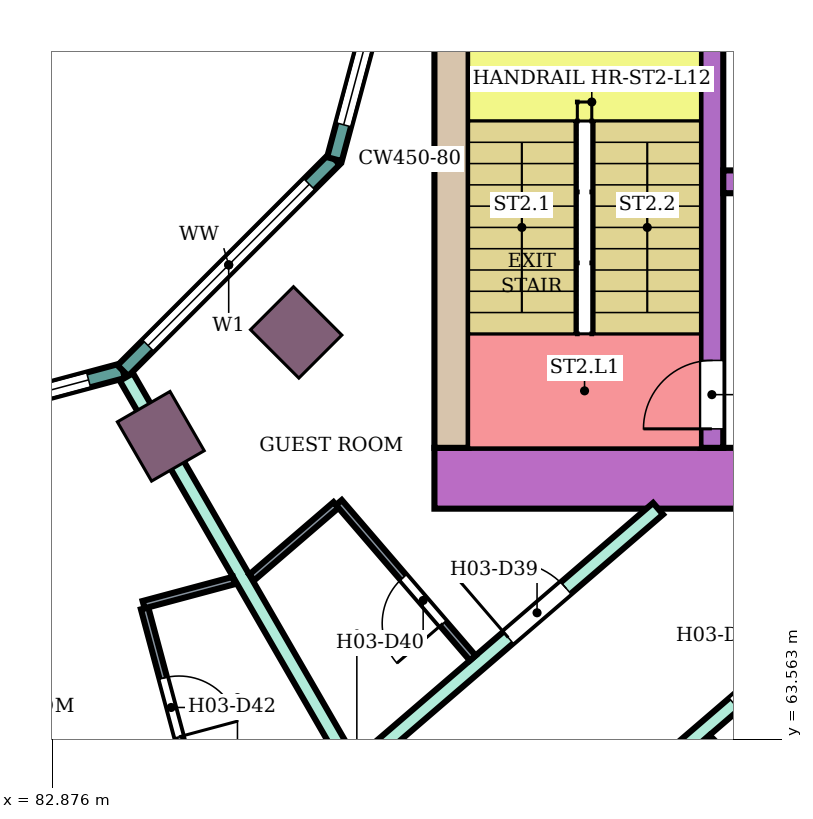
"""IFC4 building model, lengths in metres.
Left out: names, types, materials, properties, quantities, classifications, styles, units other than length and angle.
Written with IfcOpenShell. Run it as: python <this file> out.ifc"""

import sys

from ifc_helpers import new_model, si_unit, direction, frame, frame_2d, origin, origin_2d, place, context, subcontext, project, spatial, rectangle, extrude, element, fill, save


model = new_model("IFC4")
c1 = context("Model", 3, precision=1e-05, world=origin(), true_north=direction((0.0, 1.0)))
c2 = subcontext(c1, "Body", "Model", "MODEL_VIEW")
j1 = project(units=[si_unit("LENGTHUNIT", "METRE"), si_unit("PLANEANGLEUNIT", "RADIAN")], contexts=[c1])
p1 = place(None, origin())
s1 = spatial("IfcSite", under=j1, at=p1, CompositionType="ELEMENT")
p2 = place(p1, origin())
s2 = spatial("IfcBuilding", under=s1, at=p2, CompositionType="ELEMENT")
p3 = place(p2, frame((0.0, 0.0, 55.4)))
s3 = spatial("IfcBuildingStorey", under=s2, at=p3, CompositionType="ELEMENT", Elevation=55.4)
for number, where, z_axis, x_axis in (
    (1, (84.3, 67.552, 0.0), (0.0, 0.0, 1.0), (0.5, -0.866, 0.0)),
    (2, (86.081, 68.919, 0.0), (0.0, 0.0, 1.0), (0.707, -0.707, 0.0)),
):
    element("IfcColumn", number, at=place(p3, frame(where, z_axis=z_axis, x_axis=x_axis)), inside=s3, PredefinedType="COLUMN", context=c2, shape_type="SweptSolid", body=[
        extrude(rectangle(XDim=0.9, YDim=0.8, at=origin_2d()), origin(), (0.0, 0.0, 1.0), 3.8),
    ])
p4 = place(p3, frame((87.9, 67.0, 0.0), z_axis=(0.0, 0.0, 1.0), x_axis=(1.0, 0.0, 0.0)))
e3 = element("IfcWall", 3, at=p4, inside=s3, PredefinedType="SHEAR", context=c2, shape_type="SweptSolid", body=[
    extrude(rectangle(XDim=14.7, YDim=0.8, at=frame_2d((7.35, 0.0))), origin(), (0.0, 0.0, 1.0), 3.48),
])
p5 = place(p4, frame((4.2, 0.0, 0.0)))
e4 = element("IfcOpeningElement", 4, at=p5, cuts=e3, PredefinedType="OPENING", context=c2, shape_type="SweptSolid", body=[
    extrude(rectangle(XDim=2.4, YDim=2.4, at=frame_2d((1.2, 1.2))), frame((0.0, 0.41, 0.0), z_axis=(0.0, -1.0, 0.0), x_axis=(1.0, 0.0, 0.0)), (0.0, 0.0, 1.0), 0.82),
])
p6 = place(p3, frame((88.125, 67.4, 0.0), z_axis=(0.0, 0.0, 1.0), x_axis=(0.0, 1.0, 0.0)))
e5 = element("IfcWall", 5, at=p6, inside=s3, PredefinedType="SHEAR", context=c2, shape_type="SweptSolid", body=[
    extrude(rectangle(XDim=7.6, YDim=0.45, at=frame_2d((3.8, 0.0))), origin(), (0.0, 0.0, 1.0), 3.48),
])
p7 = place(p3, frame((91.55, 67.4, 0.0), z_axis=(0.0, 0.0, 1.0), x_axis=(0.0, 1.0, 0.0)))
e6 = element("IfcWall", 6, at=p7, inside=s3, PredefinedType="SHEAR", context=c2, shape_type="SweptSolid", body=[
    extrude(rectangle(XDim=7.6, YDim=0.3, at=frame_2d((3.8, 0.0))), origin(), (0.0, 0.0, 1.0), 3.48),
])
p8 = place(p7, frame((0.25, 0.0, 0.0)))
e7 = element("IfcOpeningElement", 7, at=p8, cuts=e6, PredefinedType="OPENING", context=c2, shape_type="SweptSolid", body=[
    extrude(rectangle(XDim=0.9, YDim=2.1, at=frame_2d((0.45, 1.05))), frame((0.0, 0.16, 0.0), z_axis=(0.0, -1.0, 0.0), x_axis=(1.0, 0.0, 0.0)), (0.0, 0.0, 1.0), 0.32),
])
p9 = place(p3, frame((91.7, 70.9, 0.0), z_axis=(0.0, 0.0, 1.0), x_axis=(1.0, 0.0, 0.0)))
e8 = element("IfcWall", 8, at=p9, inside=s3, PredefinedType="SHEAR", context=c2, shape_type="SweptSolid", body=[
    extrude(rectangle(XDim=10.9, YDim=0.3, at=frame_2d((5.45, 0.0))), origin(), (0.0, 0.0, 1.0), 3.48),
])
p10 = place(p9, frame((0.4, 0.0, 0.0)))
e9 = element("IfcOpeningElement", 9, at=p10, cuts=e8, PredefinedType="OPENING", context=c2, shape_type="SweptSolid", body=[
    extrude(rectangle(XDim=1.4, YDim=2.1, at=frame_2d((0.7, 1.05))), frame((0.0, 0.16, 0.0), z_axis=(0.0, -1.0, 0.0), x_axis=(1.0, 0.0, 0.0)), (0.0, 0.0, 1.0), 0.32),
])
p11 = place(p9, frame((5.4, 0.0, 0.0)))
e10 = element("IfcOpeningElement", 10, at=p11, cuts=e8, PredefinedType="OPENING", context=c2, shape_type="SweptSolid", body=[
    extrude(rectangle(XDim=1.4, YDim=2.1, at=frame_2d((0.7, 1.05))), frame((0.0, 0.16, 0.0), z_axis=(0.0, -1.0, 0.0), x_axis=(1.0, 0.0, 0.0)), (0.0, 0.0, 1.0), 0.32),
])
p12 = place(p9, frame((8.1, 0.0, 0.0)))
e11 = element("IfcOpeningElement", 11, at=p12, cuts=e8, PredefinedType="OPENING", context=c2, shape_type="SweptSolid", body=[
    extrude(rectangle(XDim=1.0, YDim=2.1, at=frame_2d((0.5, 1.05))), frame((0.0, 0.16, 0.0), z_axis=(0.0, -1.0, 0.0), x_axis=(1.0, 0.0, 0.0)), (0.0, 0.0, 1.0), 0.32),
])
p13 = place(p3, frame((80.0, 67.396, 0.0), z_axis=(0.0, 0.0, 1.0), x_axis=(0.965933654434, 0.258789828301, 0.0)))
e12 = element("IfcWall", 12, at=p13, inside=s3, PredefinedType="NOTDEFINED", context=c2, shape_type="SweptSolid", body=[
    extrude(rectangle(XDim=3.936, YDim=0.2, at=frame_2d((1.968, 0.0))), origin(), (0.0, 0.0, 1.0), 3.8),
])
p14 = place(p13, frame((0.468, 0.0, 0.9)))
e13 = element("IfcOpeningElement", 13, at=p14, cuts=e12, PredefinedType="OPENING", context=c2, shape_type="SweptSolid", body=[
    extrude(rectangle(XDim=3.0, YDim=2.3, at=frame_2d((1.5, 1.15))), frame((0.0, 0.11, 0.0), z_axis=(0.0, -1.0, 0.0), x_axis=(1.0, 0.0, 0.0)), (0.0, 0.0, 1.0), 0.22),
])
p15 = place(p3, frame((83.802, 68.415, 0.0), z_axis=(0.0, 0.0, 1.0), x_axis=(0.707106781187, 0.707106781187, 0.0)))
e14 = element("IfcWall", 14, at=p15, inside=s3, PredefinedType="NOTDEFINED", context=c2, shape_type="SweptSolid", body=[
    extrude(rectangle(XDim=3.936, YDim=0.2, at=frame_2d((1.968, 0.0))), origin(), (0.0, 0.0, 1.0), 3.8),
])
p16 = place(p15, frame((0.468, 0.0, 0.9)))
e15 = element("IfcOpeningElement", 15, at=p16, cuts=e14, PredefinedType="OPENING", context=c2, shape_type="SweptSolid", body=[
    extrude(rectangle(XDim=3.0, YDim=2.3, at=frame_2d((1.5, 1.15))), frame((0.0, 0.11, 0.0), z_axis=(0.0, -1.0, 0.0), x_axis=(1.0, 0.0, 0.0)), (0.0, 0.0, 1.0), 0.22),
])
p17 = place(p3, frame((86.585, 71.198, 0.0), z_axis=(0.0, 0.0, 1.0), x_axis=(0.258789828301, 0.965933654434, 0.0)))
e16 = element("IfcWall", 16, at=p17, inside=s3, PredefinedType="NOTDEFINED", context=c2, shape_type="SweptSolid", body=[
    extrude(rectangle(XDim=3.936, YDim=0.2, at=frame_2d((1.968, 0.0))), origin(), (0.0, 0.0, 1.0), 3.8),
])
p18 = place(p17, frame((0.468, 0.0, 0.9)))
e17 = element("IfcOpeningElement", 17, at=p18, cuts=e16, PredefinedType="OPENING", context=c2, shape_type="SweptSolid", body=[
    extrude(rectangle(XDim=3.0, YDim=2.3, at=frame_2d((1.5, 1.15))), frame((0.0, 0.11, 0.0), z_axis=(0.0, -1.0, 0.0), x_axis=(1.0, 0.0, 0.0)), (0.0, 0.0, 1.0), 0.22),
])
p19 = place(p3, frame((83.848, 68.332, 0.0), z_axis=(0.0, 0.0, 1.0), x_axis=(0.499901724708, -0.866082135617, 0.0)))
e18 = element("IfcWall", 18, at=p19, inside=s3, PredefinedType="PARTITIONING", context=c2, shape_type="SweptSolid", body=[
    extrude(rectangle(XDim=5.855, YDim=0.2, at=frame_2d((2.928, 0.0))), origin(), (0.0, 0.0, 1.0), 3.35),
])
p20 = place(p3, frame((86.877, 63.189, 0.0), z_axis=(0.0, 0.0, 1.0), x_axis=(0.758164888471, 0.652062881853, 0.0)))
e19 = element("IfcWall", 19, at=p20, inside=s3, PredefinedType="PARTITIONING", context=c2, shape_type="SweptSolid", body=[
    extrude(rectangle(XDim=5.23, YDim=0.2, at=frame_2d((2.615, 0.0))), origin(), (0.0, 0.0, 1.0), 3.35),
])
p21 = place(p20, frame((2.63, 0.0, 0.0)))
e20 = element("IfcOpeningElement", 20, at=p21, cuts=e19, PredefinedType="OPENING", context=c2, shape_type="SweptSolid", body=[
    extrude(rectangle(XDim=1.0, YDim=2.1, at=frame_2d((0.5, 1.05))), frame((0.0, 0.11, 0.0), z_axis=(0.0, -1.0, 0.0), x_axis=(1.0, 0.0, 0.0)), (0.0, 0.0, 1.0), 0.22),
])
p22 = place(p3, frame((88.236, 60.929, 0.0), z_axis=(0.0, 0.0, 1.0), x_axis=(0.758227485202, 0.651990092474, 0.0)))
e21 = element("IfcWall", 21, at=p22, inside=s3, PredefinedType="PARTITIONING", context=c2, shape_type="SweptSolid", body=[
    extrude(rectangle(XDim=6.336, YDim=0.2, at=frame_2d((3.168, 0.0))), origin(), (0.0, 0.0, 1.0), 3.35),
])
p23 = place(p22, frame((4.757, 0.0, 0.0)))
e22 = element("IfcOpeningElement", 22, at=p23, cuts=e21, PredefinedType="OPENING", context=c2, shape_type="SweptSolid", body=[
    extrude(rectangle(XDim=1.0, YDim=2.1, at=frame_2d((0.5, 1.05))), frame((0.0, 0.11, 0.0), z_axis=(0.0, -1.0, 0.0), x_axis=(1.0, 0.0, 0.0)), (0.0, 0.0, 1.0), 0.22),
])
p24 = place(p22, frame((0.43, 0.0, 0.0)))
e23 = element("IfcOpeningElement", 23, at=p24, cuts=e21, PredefinedType="OPENING", context=c2, shape_type="SweptSolid", body=[
    extrude(rectangle(XDim=1.0, YDim=2.1, at=frame_2d((0.5, 1.05))), frame((0.0, 0.11, 0.0), z_axis=(0.0, -1.0, 0.0), x_axis=(1.0, 0.0, 0.0)), (0.0, 0.0, 1.0), 0.22),
])
p25 = place(p3, frame((91.449, 63.548, 0.0), z_axis=(0.0, 0.0, 1.0), x_axis=(0.706984810649, -0.707228730688, 0.0)))
e24 = element("IfcWall", 24, at=p25, inside=s3, PredefinedType="PARTITIONING", context=c2, shape_type="SweptSolid", body=[
    extrude(rectangle(XDim=7.006, YDim=0.2, at=frame_2d((3.503, 0.0))), origin(), (0.0, 0.0, 1.0), 3.35),
])
p26 = place(p3, frame((84.087, 65.289, 0.0), z_axis=(0.0, 0.0, 1.0), x_axis=(0.258929459649, -0.965896234037, 0.0)))
e25 = element("IfcWall", 25, at=p26, inside=s3, PredefinedType="PARTITIONING", context=c2, shape_type="SweptSolid", body=[
    extrude(rectangle(XDim=2.65, YDim=0.1, at=frame_2d((1.325, 0.0))), origin(), (0.0, 0.0, 1.0), 3.35),
])
p27 = place(p26, frame((0.95, 0.0, 0.0)))
e26 = element("IfcOpeningElement", 26, at=p27, cuts=e25, PredefinedType="OPENING", context=c2, shape_type="SweptSolid", body=[
    extrude(rectangle(XDim=0.8, YDim=2.1, at=frame_2d((0.4, 1.05))), frame((0.0, 0.06, 0.0), z_axis=(0.0, -1.0, 0.0), x_axis=(1.0, 0.0, 0.0)), (0.0, 0.0, 1.0), 0.12),
])
p28 = place(p3, frame((84.074, 65.337, 0.0), z_axis=(0.0, 0.0, 1.0), x_axis=(0.965914351064, 0.258861867428, 0.0)))
e27 = element("IfcWall", 27, at=p28, inside=s3, PredefinedType="PARTITIONING", context=c2, shape_type="SweptSolid", body=[
    extrude(rectangle(XDim=1.229, YDim=0.1, at=frame_2d((0.615, 0.0))), origin(), (0.0, 0.0, 1.0), 3.35),
])
p29 = place(p3, frame((85.497, 65.696, 0.0), z_axis=(0.0, 0.0, 1.0), x_axis=(0.75817032582, 0.652056559698, 0.0)))
e28 = element("IfcWall", 28, at=p29, inside=s3, PredefinedType="PARTITIONING", context=c2, shape_type="SweptSolid", body=[
    extrude(rectangle(XDim=1.461, YDim=0.1, at=frame_2d((0.73, 0.0))), origin(), (0.0, 0.0, 1.0), 3.35),
])
p30 = place(p3, frame((86.643, 66.681, 0.0), z_axis=(0.0, 0.0, 1.0), x_axis=(0.652264876065, -0.757991115682, 0.0)))
e29 = element("IfcWall", 29, at=p30, inside=s3, PredefinedType="PARTITIONING", context=c2, shape_type="SweptSolid", body=[
    extrude(rectangle(XDim=2.699, YDim=0.1, at=frame_2d((1.35, 0.0))), origin(), (0.0, 0.0, 1.0), 3.35),
])
p31 = place(p30, frame((1.3, 0.0, 0.0)))
e30 = element("IfcOpeningElement", 30, at=p31, cuts=e29, PredefinedType="OPENING", context=c2, shape_type="SweptSolid", body=[
    extrude(rectangle(XDim=0.8, YDim=2.1, at=frame_2d((0.4, 1.05))), frame((0.0, 0.06, 0.0), z_axis=(0.0, -1.0, 0.0), x_axis=(1.0, 0.0, 0.0)), (0.0, 0.0, 1.0), 0.12),
])
p32 = place(p14, origin())
e31 = element("IfcWindow", 31, at=p32, inside=s3, PartitioningType="SINGLE_PANEL", PredefinedType="WINDOW", context=c2, shape_type="SweptSolid", body=[
    extrude(rectangle(XDim=3.0, YDim=2.3, at=frame_2d((1.5, 1.15))), frame((0.0, 0.03, 0.0), z_axis=(0.0, -1.0, 0.0), x_axis=(1.0, 0.0, 0.0)), (0.0, 0.0, 1.0), 0.06),
])
fill(e13, e31)
p33 = place(p16, origin())
e32 = element("IfcWindow", 32, at=p33, inside=s3, PartitioningType="SINGLE_PANEL", PredefinedType="WINDOW", context=c2, shape_type="SweptSolid", body=[
    extrude(rectangle(XDim=3.0, YDim=2.3, at=frame_2d((1.5, 1.15))), frame((0.0, 0.03, 0.0), z_axis=(0.0, -1.0, 0.0), x_axis=(1.0, 0.0, 0.0)), (0.0, 0.0, 1.0), 0.06),
])
fill(e15, e32)
p34 = place(p18, origin())
e33 = element("IfcWindow", 33, at=p34, inside=s3, PartitioningType="SINGLE_PANEL", PredefinedType="WINDOW", context=c2, shape_type="SweptSolid", body=[
    extrude(rectangle(XDim=3.0, YDim=2.3, at=frame_2d((1.5, 1.15))), frame((0.0, 0.03, 0.0), z_axis=(0.0, -1.0, 0.0), x_axis=(1.0, 0.0, 0.0)), (0.0, 0.0, 1.0), 0.06),
])
fill(e17, e33)
p35 = place(p23, frame((1.0, 0.0, 0.0), z_axis=(0.0, 0.0, 1.0), x_axis=(-1.0, 0.0, 0.0)))
e34 = element("IfcDoor", 34, at=p35, inside=s3, OperationType="SINGLE_SWING_RIGHT", PredefinedType="DOOR", context=c2, shape_type="SweptSolid", body=[
    extrude(rectangle(XDim=1.0, YDim=2.1, at=frame_2d((0.5, 1.05))), frame((0.0, 0.025, 0.0), z_axis=(0.0, -1.0, 0.0), x_axis=(1.0, 0.0, 0.0)), (0.0, 0.0, 1.0), 0.05),
])
fill(e22, e34)
p36 = place(p21, origin())
e35 = element("IfcDoor", 35, at=p36, inside=s3, OperationType="SINGLE_SWING_LEFT", PredefinedType="DOOR", context=c2, shape_type="SweptSolid", body=[
    extrude(rectangle(XDim=1.0, YDim=2.1, at=frame_2d((0.5, 1.05))), frame((0.0, 0.025, 0.0), z_axis=(0.0, -1.0, 0.0), x_axis=(1.0, 0.0, 0.0)), (0.0, 0.0, 1.0), 0.05),
])
fill(e20, e35)
p37 = place(p31, frame((0.8, 0.0, 0.0), z_axis=(0.0, 0.0, 1.0), x_axis=(-1.0, 0.0, 0.0)))
e36 = element("IfcDoor", 36, at=p37, inside=s3, OperationType="SINGLE_SWING_LEFT", PredefinedType="DOOR", context=c2, shape_type="SweptSolid", body=[
    extrude(rectangle(XDim=0.8, YDim=2.1, at=frame_2d((0.4, 1.05))), frame((0.0, 0.025, 0.0), z_axis=(0.0, -1.0, 0.0), x_axis=(1.0, 0.0, 0.0)), (0.0, 0.0, 1.0), 0.05),
])
fill(e30, e36)
p38 = place(p27, origin())
e37 = element("IfcDoor", 37, at=p38, inside=s3, OperationType="SINGLE_SWING_RIGHT", PredefinedType="DOOR", context=c2, shape_type="SweptSolid", body=[
    extrude(rectangle(XDim=0.8, YDim=2.1, at=frame_2d((0.4, 1.05))), frame((0.0, 0.025, 0.0), z_axis=(0.0, -1.0, 0.0), x_axis=(1.0, 0.0, 0.0)), (0.0, 0.0, 1.0), 0.05),
])
fill(e26, e37)
p39 = place(p8, origin())
e38 = element("IfcDoor", 38, at=p39, inside=s3, OperationType="SINGLE_SWING_LEFT", PredefinedType="DOOR", context=c2, shape_type="SweptSolid", body=[
    extrude(rectangle(XDim=0.9, YDim=2.1, at=frame_2d((0.45, 1.05))), frame((0.0, 0.025, 0.0), z_axis=(0.0, -1.0, 0.0), x_axis=(1.0, 0.0, 0.0)), (0.0, 0.0, 1.0), 0.05),
])
fill(e7, e38)
save(model, sys.argv[1])
